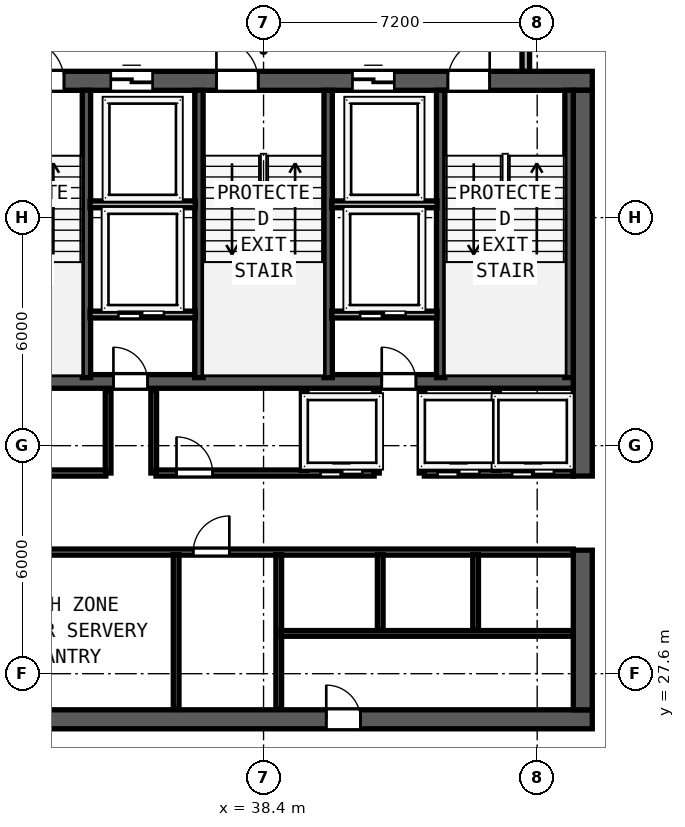
"""IFC4 building model, lengths in metres.
Left out: names, types, materials, properties, quantities, classifications, styles, units other than length and angle.
Written with IfcOpenShell. Run it as: python <this file> out.ifc"""

import sys

from ifc_helpers import new_model, si_unit, direction, frame, frame_2d, origin, place, context, subcontext, project, spatial, rectangle, extrude, element, fill, save


model = new_model("IFC4")
c1 = context("Model", 3, precision=1e-05, world=origin(), true_north=direction((0.0, 1.0)))
c2 = subcontext(c1, "Body", "Model", "MODEL_VIEW")
j1 = project(units=[si_unit("LENGTHUNIT", "METRE"), si_unit("PLANEANGLEUNIT", "RADIAN")], contexts=[c1])
p1 = place(None, origin())
s1 = spatial("IfcSite", under=j1, at=p1, CompositionType="ELEMENT")
p2 = place(p1, origin())
s2 = spatial("IfcBuilding", under=s1, at=p2, CompositionType="ELEMENT")
p3 = place(p2, frame((0.0, 0.0, 262.15)))
s3 = spatial("IfcBuildingStorey", under=s2, at=p3, CompositionType="ELEMENT", Elevation=262.15)
p4 = place(p3, frame((29.75, 26.4, 0.0), z_axis=(0.0, 0.0, 1.0), x_axis=(1.0, 0.0, 0.0)))
e1 = element("IfcWall", 1, at=p4, inside=s3, PredefinedType="SHEAR", context=c2, shape_type="SweptSolid", body=[
    extrude(rectangle(XDim=17.3, YDim=0.5, at=frame_2d((8.65, 0.0))), origin(), (0.0, 0.0, 1.0), 3.67),
])
p5 = place(p4, frame((11.2, 0.0, 0.0), z_axis=(0.0, 0.0, 1.0), x_axis=(-1.0, 0.0, 0.0)))
e2 = element("IfcOpeningElement", 2, at=p5, cuts=e1, PredefinedType="OPENING", context=c2, shape_type="SweptSolid", body=[
    extrude(rectangle(XDim=0.9, YDim=2.1, at=frame_2d((0.45, 1.05))), frame((0.0, 0.26, 0.0), z_axis=(0.0, -1.0, 0.0), x_axis=(1.0, 0.0, 0.0)), (0.0, 0.0, 1.0), 0.52),
])
p6 = place(p3, frame((29.75, 43.2, 0.0), z_axis=(0.0, 0.0, 1.0), x_axis=(1.0, 0.0, 0.0)))
e3 = element("IfcWall", 3, at=p6, inside=s3, PredefinedType="SHEAR", context=c2, shape_type="SweptSolid", body=[
    extrude(rectangle(XDim=17.3, YDim=0.5, at=frame_2d((8.65, 0.0))), origin(), (0.0, 0.0, 1.0), 3.67),
])
p7 = place(p6, frame((2.3, 0.0, 0.0)))
e4 = element("IfcOpeningElement", 4, at=p7, cuts=e3, PredefinedType="OPENING", context=c2, shape_type="SweptSolid", body=[
    extrude(rectangle(XDim=1.1, YDim=2.15, at=frame_2d((0.55, 1.075))), frame((0.0, 0.26, 0.0), z_axis=(0.0, -1.0, 0.0), x_axis=(1.0, 0.0, 0.0)), (0.0, 0.0, 1.0), 0.52),
])
p8 = place(p6, frame((7.41, 0.0, 0.0)))
e5 = element("IfcOpeningElement", 5, at=p8, cuts=e3, PredefinedType="OPENING", context=c2, shape_type="SweptSolid", body=[
    extrude(rectangle(XDim=1.1, YDim=2.15, at=frame_2d((0.55, 1.075))), frame((0.0, 0.26, 0.0), z_axis=(0.0, -1.0, 0.0), x_axis=(1.0, 0.0, 0.0)), (0.0, 0.0, 1.0), 0.52),
])
p9 = place(p6, frame((13.5, 0.0, 0.0)))
e6 = element("IfcOpeningElement", 6, at=p9, cuts=e3, PredefinedType="OPENING", context=c2, shape_type="SweptSolid", body=[
    extrude(rectangle(XDim=1.1, YDim=2.15, at=frame_2d((0.55, 1.075))), frame((0.0, 0.26, 0.0), z_axis=(0.0, -1.0, 0.0), x_axis=(1.0, 0.0, 0.0)), (0.0, 0.0, 1.0), 0.52),
])
p10 = place(p6, frame((4.63, 0.0, 0.0)))
e7 = element("IfcOpeningElement", 7, at=p10, cuts=e3, PredefinedType="OPENING", context=c2, shape_type="SweptSolid", body=[
    extrude(rectangle(XDim=1.1, YDim=2.2, at=frame_2d((0.55, 1.1))), frame((0.0, 0.26, 0.0), z_axis=(0.0, -1.0, 0.0), x_axis=(1.0, 0.0, 0.0)), (0.0, 0.0, 1.0), 0.52),
])
p11 = place(p6, frame((10.99, 0.0, 0.0)))
e8 = element("IfcOpeningElement", 8, at=p11, cuts=e3, PredefinedType="OPENING", context=c2, shape_type="SweptSolid", body=[
    extrude(rectangle(XDim=1.1, YDim=2.2, at=frame_2d((0.55, 1.1))), frame((0.0, 0.26, 0.0), z_axis=(0.0, -1.0, 0.0), x_axis=(1.0, 0.0, 0.0)), (0.0, 0.0, 1.0), 0.52),
])
p12 = place(p3, frame((46.8, 26.65, 0.0), z_axis=(0.0, 0.0, 1.0), x_axis=(0.0, 1.0, 0.0)))
e9 = element("IfcWall", 9, at=p12, inside=s3, PredefinedType="SHEAR", context=c2, shape_type="SweptSolid", body=[
    extrude(rectangle(XDim=4.2, YDim=0.5, at=frame_2d((2.1, 0.0))), origin(), (0.0, 0.0, 1.0), 3.67),
])
p13 = place(p3, frame((46.8, 32.8, 0.0), z_axis=(0.0, 0.0, 1.0), x_axis=(0.0, 1.0, 0.0)))
e10 = element("IfcWall", 10, at=p13, inside=s3, PredefinedType="SHEAR", context=c2, shape_type="SweptSolid", body=[
    extrude(rectangle(XDim=10.15, YDim=0.5, at=frame_2d((5.075, 0.0))), origin(), (0.0, 0.0, 1.0), 3.67),
])
p14 = place(p3, frame((30.25, 35.29, 0.0), z_axis=(0.0, 0.0, 1.0), x_axis=(1.0, 0.0, 0.0)))
e11 = element("IfcWall", 11, at=p14, inside=s3, PredefinedType="SHEAR", context=c2, shape_type="SweptSolid", body=[
    extrude(rectangle(XDim=16.3, YDim=0.36, at=frame_2d((8.15, 0.0))), origin(), (0.0, 0.0, 1.0), 3.67),
])
p15 = place(p14, frame((5.1, 0.0, 0.0), z_axis=(0.0, 0.0, 1.0), x_axis=(-1.0, 0.0, 0.0)))
e12 = element("IfcOpeningElement", 12, at=p15, cuts=e11, PredefinedType="OPENING", context=c2, shape_type="SweptSolid", body=[
    extrude(rectangle(XDim=0.9, YDim=2.1, at=frame_2d((0.45, 1.05))), frame((0.0, 0.19, 0.0), z_axis=(0.0, -1.0, 0.0), x_axis=(1.0, 0.0, 0.0)), (0.0, 0.0, 1.0), 0.38),
])
p16 = place(p14, frame((12.16, 0.0, 0.0), z_axis=(0.0, 0.0, 1.0), x_axis=(-1.0, 0.0, 0.0)))
e13 = element("IfcOpeningElement", 13, at=p16, cuts=e11, PredefinedType="OPENING", context=c2, shape_type="SweptSolid", body=[
    extrude(rectangle(XDim=0.9, YDim=2.1, at=frame_2d((0.45, 1.05))), frame((0.0, 0.19, 0.0), z_axis=(0.0, -1.0, 0.0), x_axis=(1.0, 0.0, 0.0)), (0.0, 0.0, 1.0), 0.38),
])
for number, where, z_axis, x_axis in (
    (14, (33.74, 35.39, 0.0), (0.0, 0.0, 1.0), (0.0, 1.0, 0.0)),
    (15, (36.7, 35.39, 0.0), (0.0, 0.0, 1.0), (0.0, 1.0, 0.0)),
    (16, (40.1, 35.39, 0.0), (0.0, 0.0, 1.0), (0.0, 1.0, 0.0)),
    (17, (43.06, 35.39, 0.0), (0.0, 0.0, 1.0), (0.0, 1.0, 0.0)),
    (18, (46.438, 35.39, 0.0), (0.0, 0.0, 1.0), (0.0, 1.0, 0.0)),
):
    element("IfcWall", number, at=place(p3, frame(where, z_axis=z_axis, x_axis=x_axis)), inside=s3, PredefinedType="SHEAR", context=c2, shape_type="SweptSolid", body=[
        extrude(rectangle(XDim=7.56, YDim=0.22, at=frame_2d((3.78, 0.0))), origin(), (0.0, 0.0, 1.0), 3.67),
    ])
p17 = place(p3, frame((45.3, 43.45, 0.0), z_axis=(0.0, 0.0, 1.0), x_axis=(0.0, 1.0, 0.0)))
e19 = element("IfcWall", 19, at=p17, inside=s3, PredefinedType="SOLIDWALL", context=c2, shape_type="SweptSolid", body=[
    extrude(rectangle(XDim=2.445, YDim=0.2, at=frame_2d((1.223, 0.0))), origin(), (0.0, 0.0, 1.0), 3.67),
])
p18 = place(p17, frame((0.7, 0.0, 0.0)))
e20 = element("IfcOpeningElement", 20, at=p18, cuts=e19, PredefinedType="OPENING", context=c2, shape_type="SweptSolid", body=[
    extrude(rectangle(XDim=1.1, YDim=2.15, at=frame_2d((0.55, 1.075))), frame((0.0, 0.11, 0.0), z_axis=(0.0, -1.0, 0.0), x_axis=(1.0, 0.0, 0.0)), (0.0, 0.0, 1.0), 0.22),
])
for number, where, z_axis, x_axis in (
    (21, (33.835, 39.95, 0.0), (0.0, 0.0, 1.0), (1.0, 0.0, 0.0)),
    (22, (40.195, 39.95, 0.0), (0.0, 0.0, 1.0), (1.0, 0.0, 0.0)),
):
    element("IfcWall", number, at=place(p3, frame(where, z_axis=z_axis, x_axis=x_axis)), inside=s3, PredefinedType="SOLIDWALL", context=c2, shape_type="SweptSolid", body=[
        extrude(rectangle(XDim=2.77, YDim=0.18, at=frame_2d((1.385, 0.0))), origin(), (0.0, 0.0, 1.0), 3.67),
    ])
p19 = place(p3, frame((33.835, 37.05, 0.0), z_axis=(0.0, 0.0, 1.0), x_axis=(1.0, 0.0, 0.0)))
e23 = element("IfcWall", 23, at=p19, inside=s3, PredefinedType="SOLIDWALL", context=c2, shape_type="SweptSolid", body=[
    extrude(rectangle(XDim=2.77, YDim=0.18, at=frame_2d((1.385, 0.0))), origin(), (0.0, 0.0, 1.0), 3.67),
])
p20 = place(p19, frame((1.945, 0.0, 0.0), z_axis=(0.0, 0.0, 1.0), x_axis=(-1.0, 0.0, 0.0)))
e24 = element("IfcOpeningElement", 24, at=p20, cuts=e23, PredefinedType="OPENING", context=c2, shape_type="SweptSolid", body=[
    extrude(rectangle(XDim=1.2, YDim=2.2, at=frame_2d((0.6, 1.1))), frame((0.0, 0.1, 0.0), z_axis=(0.0, -1.0, 0.0), x_axis=(1.0, 0.0, 0.0)), (0.0, 0.0, 1.0), 0.2),
])
for number, where, z_axis, x_axis in (
    (25, (34.31, 32.88, 0.0), (0.0, 0.0, 1.0), (0.0, 1.0, 0.0)),
    (26, (35.51, 32.88, 0.0), (0.0, 0.0, 1.0), (0.0, 1.0, 0.0)),
):
    element("IfcWall", number, at=place(p3, frame(where, z_axis=z_axis, x_axis=x_axis)), inside=s3, PredefinedType="SOLIDWALL", context=c2, shape_type="SweptSolid", body=[
        extrude(rectangle(XDim=2.17, YDim=0.15, at=frame_2d((1.085, 0.0))), origin(), (0.0, 0.0, 1.0), 3.67),
    ])
p21 = place(p3, frame((40.195, 37.05, 0.0), z_axis=(0.0, 0.0, 1.0), x_axis=(1.0, 0.0, 0.0)))
e27 = element("IfcWall", 27, at=p21, inside=s3, PredefinedType="SOLIDWALL", context=c2, shape_type="SweptSolid", body=[
    extrude(rectangle(XDim=2.77, YDim=0.18, at=frame_2d((1.385, 0.0))), origin(), (0.0, 0.0, 1.0), 3.67),
])
p22 = place(p21, frame((1.945, 0.0, 0.0), z_axis=(0.0, 0.0, 1.0), x_axis=(-1.0, 0.0, 0.0)))
e28 = element("IfcOpeningElement", 28, at=p22, cuts=e27, PredefinedType="OPENING", context=c2, shape_type="SweptSolid", body=[
    extrude(rectangle(XDim=1.2, YDim=2.2, at=frame_2d((0.6, 1.1))), frame((0.0, 0.1, 0.0), z_axis=(0.0, -1.0, 0.0), x_axis=(1.0, 0.0, 0.0)), (0.0, 0.0, 1.0), 0.2),
])
for number, where, z_axis, x_axis in (
    (29, (41.37, 32.88, 0.0), (0.0, 0.0, 1.0), (0.0, 1.0, 0.0)),
    (30, (42.57, 32.88, 0.0), (0.0, 0.0, 1.0), (0.0, 1.0, 0.0)),
):
    element("IfcWall", number, at=place(p3, frame(where, z_axis=z_axis, x_axis=x_axis)), inside=s3, PredefinedType="SOLIDWALL", context=c2, shape_type="SweptSolid", body=[
        extrude(rectangle(XDim=2.17, YDim=0.15, at=frame_2d((1.085, 0.0))), origin(), (0.0, 0.0, 1.0), 3.67),
    ])
p23 = place(p3, frame((30.25, 32.88, 0.0), z_axis=(0.0, 0.0, 1.0), x_axis=(1.0, 0.0, 0.0)))
e31 = element("IfcWall", 31, at=p23, inside=s3, PredefinedType="SOLIDWALL", context=c2, shape_type="SweptSolid", body=[
    extrude(rectangle(XDim=4.0, YDim=0.16, at=frame_2d((2.0, 0.0))), origin(), (0.0, 0.0, 1.0), 3.67),
])
p24 = place(p23, frame((2.2, 0.0, 0.0), z_axis=(0.0, 0.0, 1.0), x_axis=(-1.0, 0.0, 0.0)))
e32 = element("IfcOpeningElement", 32, at=p24, cuts=e31, PredefinedType="OPENING", context=c2, shape_type="SweptSolid", body=[
    extrude(rectangle(XDim=0.95, YDim=2.12, at=frame_2d((0.475, 1.06))), frame((0.0, 0.09, 0.0), z_axis=(0.0, -1.0, 0.0), x_axis=(1.0, 0.0, 0.0)), (0.0, 0.0, 1.0), 0.18),
])
p25 = place(p3, frame((35.57, 32.88, 0.0), z_axis=(0.0, 0.0, 1.0), x_axis=(1.0, 0.0, 0.0)))
e33 = element("IfcWall", 33, at=p25, inside=s3, PredefinedType="SOLIDWALL", context=c2, shape_type="SweptSolid", body=[
    extrude(rectangle(XDim=5.74, YDim=0.16, at=frame_2d((2.87, 0.0))), origin(), (0.0, 0.0, 1.0), 3.67),
])
p26 = place(p25, frame((1.49, 0.0, 0.0), z_axis=(0.0, 0.0, 1.0), x_axis=(-1.0, 0.0, 0.0)))
e34 = element("IfcOpeningElement", 34, at=p26, cuts=e33, PredefinedType="OPENING", context=c2, shape_type="SweptSolid", body=[
    extrude(rectangle(XDim=0.95, YDim=2.12, at=frame_2d((0.475, 1.06))), frame((0.0, 0.09, 0.0), z_axis=(0.0, -1.0, 0.0), x_axis=(1.0, 0.0, 0.0)), (0.0, 0.0, 1.0), 0.18),
])
p27 = place(p25, frame((5.43, 0.0, 0.0), z_axis=(0.0, 0.0, 1.0), x_axis=(-1.0, 0.0, 0.0)))
e35 = element("IfcOpeningElement", 35, at=p27, cuts=e33, PredefinedType="OPENING", context=c2, shape_type="SweptSolid", body=[
    extrude(rectangle(XDim=1.1, YDim=2.2, at=frame_2d((0.55, 1.1))), frame((0.0, 0.09, 0.0), z_axis=(0.0, -1.0, 0.0), x_axis=(1.0, 0.0, 0.0)), (0.0, 0.0, 1.0), 0.18),
])
p28 = place(p3, frame((42.63, 32.88, 0.0), z_axis=(0.0, 0.0, 1.0), x_axis=(1.0, 0.0, 0.0)))
e36 = element("IfcWall", 36, at=p28, inside=s3, PredefinedType="SOLIDWALL", context=c2, shape_type="SweptSolid", body=[
    extrude(rectangle(XDim=3.92, YDim=0.16, at=frame_2d((1.96, 0.0))), origin(), (0.0, 0.0, 1.0), 3.67),
])
p29 = place(p28, frame((1.45, 0.0, 0.0), z_axis=(0.0, 0.0, 1.0), x_axis=(-1.0, 0.0, 0.0)))
e37 = element("IfcOpeningElement", 37, at=p29, cuts=e36, PredefinedType="OPENING", context=c2, shape_type="SweptSolid", body=[
    extrude(rectangle(XDim=1.1, YDim=2.2, at=frame_2d((0.55, 1.1))), frame((0.0, 0.09, 0.0), z_axis=(0.0, -1.0, 0.0), x_axis=(1.0, 0.0, 0.0)), (0.0, 0.0, 1.0), 0.18),
])
p30 = place(p28, frame((3.41, 0.0, 0.0), z_axis=(0.0, 0.0, 1.0), x_axis=(-1.0, 0.0, 0.0)))
e38 = element("IfcOpeningElement", 38, at=p30, cuts=e36, PredefinedType="OPENING", context=c2, shape_type="SweptSolid", body=[
    extrude(rectangle(XDim=1.1, YDim=2.2, at=frame_2d((0.55, 1.1))), frame((0.0, 0.09, 0.0), z_axis=(0.0, -1.0, 0.0), x_axis=(1.0, 0.0, 0.0)), (0.0, 0.0, 1.0), 0.18),
])
for number, where, z_axis, x_axis in (
    (39, (39.47, 32.95, 0.0), (0.0, 0.0, 1.0), (0.0, 1.0, 0.0)),
    (40, (44.53, 32.95, 0.0), (0.0, 0.0, 1.0), (0.0, 1.0, 0.0)),
):
    element("IfcWall", number, at=place(p3, frame(where, z_axis=z_axis, x_axis=x_axis)), inside=s3, PredefinedType="SOLIDWALL", context=c2, shape_type="SweptSolid", body=[
        extrude(rectangle(XDim=2.05, YDim=0.15, at=frame_2d((1.025, 0.0))), origin(), (0.0, 0.0, 1.0), 3.67),
    ])
p31 = place(p3, frame((30.25, 30.8, 0.0), z_axis=(0.0, 0.0, 1.0), x_axis=(1.0, 0.0, 0.0)))
e41 = element("IfcWall", 41, at=p31, inside=s3, PredefinedType="SOLIDWALL", context=c2, shape_type="SweptSolid", body=[
    extrude(rectangle(XDim=16.3, YDim=0.16, at=frame_2d((8.15, 0.0))), origin(), (0.0, 0.0, 1.0), 3.67),
])
p32 = place(p31, frame((1.6, 0.0, 0.0)))
e42 = element("IfcOpeningElement", 42, at=p32, cuts=e41, PredefinedType="OPENING", context=c2, shape_type="SweptSolid", body=[
    extrude(rectangle(XDim=0.95, YDim=2.12, at=frame_2d((0.475, 1.06))), frame((0.0, 0.09, 0.0), z_axis=(0.0, -1.0, 0.0), x_axis=(1.0, 0.0, 0.0)), (0.0, 0.0, 1.0), 0.18),
])
p33 = place(p31, frame((6.3, 0.0, 0.0)))
e43 = element("IfcOpeningElement", 43, at=p33, cuts=e41, PredefinedType="OPENING", context=c2, shape_type="SweptSolid", body=[
    extrude(rectangle(XDim=0.95, YDim=2.12, at=frame_2d((0.475, 1.06))), frame((0.0, 0.09, 0.0), z_axis=(0.0, -1.0, 0.0), x_axis=(1.0, 0.0, 0.0)), (0.0, 0.0, 1.0), 0.18),
])
p34 = place(p3, frame((38.8, 26.66, 0.0), z_axis=(0.0, 0.0, 1.0), x_axis=(0.0, 1.0, 0.0)))
e44 = element("IfcWall", 44, at=p34, inside=s3, PredefinedType="SOLIDWALL", context=c2, shape_type="SweptSolid", body=[
    extrude(rectangle(XDim=4.075, YDim=0.15, at=frame_2d((2.038, 0.0))), origin(), (0.0, 0.0, 1.0), 3.67),
])
p35 = place(p3, frame((36.1, 26.66, 0.0), z_axis=(0.0, 0.0, 1.0), x_axis=(0.0, 1.0, 0.0)))
e45 = element("IfcWall", 45, at=p35, inside=s3, PredefinedType="PARTITIONING", context=c2, shape_type="SweptSolid", body=[
    extrude(rectangle(XDim=4.075, YDim=0.15, at=frame_2d((2.038, 0.0))), origin(), (0.0, 0.0, 1.0), 3.67),
])
p36 = place(p3, frame((38.86, 28.66, 0.0), z_axis=(0.0, 0.0, 1.0), x_axis=(1.0, 0.0, 0.0)))
e46 = element("IfcWall", 46, at=p36, inside=s3, PredefinedType="PARTITIONING", context=c2, shape_type="SweptSolid", body=[
    extrude(rectangle(XDim=7.69, YDim=0.15, at=frame_2d((3.845, 0.0))), origin(), (0.0, 0.0, 1.0), 3.67),
])
for number, where, z_axis, x_axis in (
    (47, (41.47, 28.75, 0.0), (0.0, 0.0, 1.0), (0.0, 1.0, 0.0)),
    (48, (43.98, 28.75, 0.0), (0.0, 0.0, 1.0), (0.0, 1.0, 0.0)),
):
    element("IfcWall", number, at=place(p3, frame(where, z_axis=z_axis, x_axis=x_axis)), inside=s3, PredefinedType="SOLIDWALL", context=c2, shape_type="SweptSolid", body=[
        extrude(rectangle(XDim=1.985, YDim=0.15, at=frame_2d((0.993, 0.0))), origin(), (0.0, 0.0, 1.0), 3.67),
    ])
p37 = place(p7, origin())
e49 = element("IfcDoor", 49, at=p37, inside=s3, OperationType="SINGLE_SWING_LEFT", PredefinedType="DOOR", context=c2, shape_type="SweptSolid", body=[
    extrude(rectangle(XDim=1.1, YDim=2.15, at=frame_2d((0.55, 1.075))), frame((0.0, 0.185, 0.0), z_axis=(0.0, -1.0, 0.0), x_axis=(1.0, 0.0, 0.0)), (0.0, 0.0, 1.0), 0.05),
])
fill(e4, e49)
p38 = place(p8, origin())
e50 = element("IfcDoor", 50, at=p38, inside=s3, OperationType="SINGLE_SWING_LEFT", PredefinedType="DOOR", context=c2, shape_type="SweptSolid", body=[
    extrude(rectangle(XDim=1.1, YDim=2.15, at=frame_2d((0.55, 1.075))), frame((0.0, 0.185, 0.0), z_axis=(0.0, -1.0, 0.0), x_axis=(1.0, 0.0, 0.0)), (0.0, 0.0, 1.0), 0.05),
])
fill(e5, e50)
p39 = place(p9, origin())
e51 = element("IfcDoor", 51, at=p39, inside=s3, OperationType="SINGLE_SWING_RIGHT", PredefinedType="DOOR", context=c2, shape_type="SweptSolid", body=[
    extrude(rectangle(XDim=1.1, YDim=2.15, at=frame_2d((0.55, 1.075))), frame((0.0, 0.185, 0.0), z_axis=(0.0, -1.0, 0.0), x_axis=(1.0, 0.0, 0.0)), (0.0, 0.0, 1.0), 0.05),
])
fill(e6, e51)
p40 = place(p10, origin())
e52 = element("IfcDoor", 52, at=p40, inside=s3, OperationType="SLIDING_TO_LEFT", PredefinedType="DOOR", context=c2, shape_type="SweptSolid", body=[
    extrude(rectangle(XDim=1.1, YDim=2.2, at=frame_2d((0.55, 1.1))), frame((0.0, 0.185, 0.0), z_axis=(0.0, -1.0, 0.0), x_axis=(1.0, 0.0, 0.0)), (0.0, 0.0, 1.0), 0.05),
])
fill(e7, e52)
p41 = place(p11, origin())
e53 = element("IfcDoor", 53, at=p41, inside=s3, OperationType="SLIDING_TO_LEFT", PredefinedType="DOOR", context=c2, shape_type="SweptSolid", body=[
    extrude(rectangle(XDim=1.1, YDim=2.2, at=frame_2d((0.55, 1.1))), frame((0.0, 0.185, 0.0), z_axis=(0.0, -1.0, 0.0), x_axis=(1.0, 0.0, 0.0)), (0.0, 0.0, 1.0), 0.05),
])
fill(e8, e53)
p42 = place(p20, origin())
e54 = element("IfcDoor", 54, at=p42, inside=s3, OperationType="SLIDING_TO_RIGHT", PredefinedType="DOOR", context=c2, shape_type="SweptSolid", body=[
    extrude(rectangle(XDim=1.2, YDim=2.2, at=frame_2d((0.6, 1.1))), frame((0.0, 0.025, 0.0), z_axis=(0.0, -1.0, 0.0), x_axis=(1.0, 0.0, 0.0)), (0.0, 0.0, 1.0), 0.05),
])
fill(e24, e54)
p43 = place(p15, origin())
e55 = element("IfcDoor", 55, at=p43, inside=s3, OperationType="SINGLE_SWING_RIGHT", PredefinedType="DOOR", context=c2, shape_type="SweptSolid", body=[
    extrude(rectangle(XDim=0.9, YDim=2.1, at=frame_2d((0.45, 1.05))), frame((0.0, 0.025, 0.0), z_axis=(0.0, -1.0, 0.0), x_axis=(1.0, 0.0, 0.0)), (0.0, 0.0, 1.0), 0.05),
])
fill(e12, e55)
p44 = place(p22, origin())
e56 = element("IfcDoor", 56, at=p44, inside=s3, OperationType="SLIDING_TO_RIGHT", PredefinedType="DOOR", context=c2, shape_type="SweptSolid", body=[
    extrude(rectangle(XDim=1.2, YDim=2.2, at=frame_2d((0.6, 1.1))), frame((0.0, 0.025, 0.0), z_axis=(0.0, -1.0, 0.0), x_axis=(1.0, 0.0, 0.0)), (0.0, 0.0, 1.0), 0.05),
])
fill(e28, e56)
p45 = place(p16, origin())
e57 = element("IfcDoor", 57, at=p45, inside=s3, OperationType="SINGLE_SWING_RIGHT", PredefinedType="DOOR", context=c2, shape_type="SweptSolid", body=[
    extrude(rectangle(XDim=0.9, YDim=2.1, at=frame_2d((0.45, 1.05))), frame((0.0, 0.025, 0.0), z_axis=(0.0, -1.0, 0.0), x_axis=(1.0, 0.0, 0.0)), (0.0, 0.0, 1.0), 0.05),
])
fill(e13, e57)
p46 = place(p26, origin())
e58 = element("IfcDoor", 58, at=p46, inside=s3, OperationType="SINGLE_SWING_RIGHT", PredefinedType="DOOR", context=c2, shape_type="SweptSolid", body=[
    extrude(rectangle(XDim=0.95, YDim=2.12, at=frame_2d((0.475, 1.06))), frame((0.0, 0.025, 0.0), z_axis=(0.0, -1.0, 0.0), x_axis=(1.0, 0.0, 0.0)), (0.0, 0.0, 1.0), 0.05),
])
fill(e34, e58)
p47 = place(p27, origin())
e59 = element("IfcDoor", 59, at=p47, inside=s3, OperationType="SLIDING_TO_RIGHT", PredefinedType="DOOR", context=c2, shape_type="SweptSolid", body=[
    extrude(rectangle(XDim=1.1, YDim=2.2, at=frame_2d((0.55, 1.1))), frame((0.0, 0.025, 0.0), z_axis=(0.0, -1.0, 0.0), x_axis=(1.0, 0.0, 0.0)), (0.0, 0.0, 1.0), 0.05),
])
fill(e35, e59)
p48 = place(p29, origin())
e60 = element("IfcDoor", 60, at=p48, inside=s3, OperationType="SLIDING_TO_RIGHT", PredefinedType="DOOR", context=c2, shape_type="SweptSolid", body=[
    extrude(rectangle(XDim=1.1, YDim=2.2, at=frame_2d((0.55, 1.1))), frame((0.0, 0.025, 0.0), z_axis=(0.0, -1.0, 0.0), x_axis=(1.0, 0.0, 0.0)), (0.0, 0.0, 1.0), 0.05),
])
fill(e37, e60)
p49 = place(p30, origin())
e61 = element("IfcDoor", 61, at=p49, inside=s3, OperationType="SLIDING_TO_RIGHT", PredefinedType="DOOR", context=c2, shape_type="SweptSolid", body=[
    extrude(rectangle(XDim=1.1, YDim=2.2, at=frame_2d((0.55, 1.1))), frame((0.0, 0.025, 0.0), z_axis=(0.0, -1.0, 0.0), x_axis=(1.0, 0.0, 0.0)), (0.0, 0.0, 1.0), 0.05),
])
fill(e38, e61)
p50 = place(p33, origin())
e62 = element("IfcDoor", 62, at=p50, inside=s3, OperationType="SINGLE_SWING_RIGHT", PredefinedType="DOOR", context=c2, shape_type="SweptSolid", body=[
    extrude(rectangle(XDim=0.95, YDim=2.12, at=frame_2d((0.475, 1.06))), frame((0.0, 0.025, 0.0), z_axis=(0.0, -1.0, 0.0), x_axis=(1.0, 0.0, 0.0)), (0.0, 0.0, 1.0), 0.05),
])
fill(e43, e62)
p51 = place(p5, origin())
e63 = element("IfcDoor", 63, at=p51, inside=s3, OperationType="SINGLE_SWING_RIGHT", PredefinedType="DOOR", context=c2, shape_type="SweptSolid", body=[
    extrude(rectangle(XDim=0.9, YDim=2.1, at=frame_2d((0.45, 1.05))), frame((0.0, -0.195, 0.0), z_axis=(0.0, -1.0, 0.0), x_axis=(1.0, 0.0, 0.0)), (0.0, 0.0, 1.0), 0.05),
])
fill(e2, e63)
save(model, sys.argv[1])
